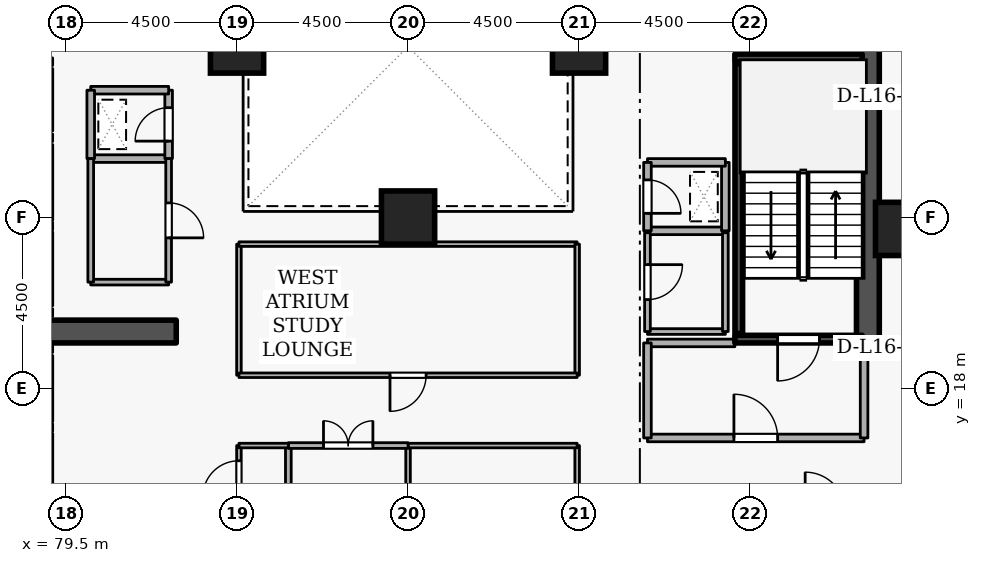
"""IFC4 building model, lengths in metres.
Left out: names, types, materials, properties, quantities, classifications, styles, units other than length and angle.
Written with IfcOpenShell. Run it as: python <this file> out.ifc"""

import sys

from ifc_helpers import new_model, si_unit, direction, frame, frame_2d, origin, origin_2d, place, context, subcontext, project, spatial, rectangle, extrude, element, fill, save


model = new_model("IFC4")
c1 = context("Model", 3, precision=1e-05, world=origin(), true_north=direction((0.0, 1.0)))
c2 = subcontext(c1, "Body", "Model", "MODEL_VIEW")
j1 = project(units=[si_unit("LENGTHUNIT", "METRE"), si_unit("PLANEANGLEUNIT", "RADIAN")], contexts=[c1])
p1 = place(None, origin())
s1 = spatial("IfcSite", under=j1, at=p1, CompositionType="ELEMENT")
p2 = place(p1, origin())
s2 = spatial("IfcBuilding", under=s1, at=p2, CompositionType="ELEMENT")
p3 = place(p2, frame((0.0, 0.0, 64.5)))
s3 = spatial("IfcBuildingStorey", under=s2, at=p3, CompositionType="ELEMENT", Elevation=64.5)
p4 = place(p3, frame((100.6, 19.2, 0.0), z_axis=(0.0, 0.0, 1.0), x_axis=(0.0, 1.0, 0.0)))
e1 = element("IfcWall", 1, at=p4, inside=s3, PredefinedType="SHEAR", context=c2, shape_type="SweptSolid", body=[
    extrude(rectangle(XDim=15.6, YDim=0.6, at=frame_2d((7.8, 0.0))), origin(), (0.0, 0.0, 1.0), 3.6),
])
p5 = place(p3, frame((76.7, 19.5, 0.0), z_axis=(0.0, 0.0, 1.0), x_axis=(1.0, 0.0, 0.0)))
e2 = element("IfcWall", 2, at=p5, inside=s3, PredefinedType="SHEAR", context=c2, shape_type="SweptSolid", body=[
    extrude(rectangle(XDim=5.7, YDim=0.6, at=frame_2d((2.85, 0.0))), origin(), (0.0, 0.0, 1.0), 3.6),
])
for number, where, z_axis, x_axis in (
    (3, (101.5, 22.2, 0.0), (0.0, 0.0, 1.0), (1.0, 0.0, 0.0)),
    (4, (93.0, 27.0, 0.0), (0.0, 0.0, 1.0), (1.0, 0.0, 0.0)),
    (5, (84.0, 27.0, 0.0), (0.0, 0.0, 1.0), (1.0, 0.0, 0.0)),
    (6, (88.5, 22.5, 0.0), (0.0, 0.0, 1.0), (1.0, 0.0, 0.0)),
):
    element("IfcColumn", number, at=place(p3, frame(where, z_axis=z_axis, x_axis=x_axis)), inside=s3, PredefinedType="COLUMN", context=c2, shape_type="SweptSolid", body=[
        extrude(rectangle(XDim=1.4, YDim=1.4, at=origin_2d()), origin(), (0.0, 0.0, 1.0), 3.6),
    ])
p6 = place(p3, frame((79.05, 24.78, 0.0), z_axis=(0.0, 0.0, 1.0), x_axis=(0.0, 1.0, 0.0)))
e7 = element("IfcWall", 7, at=p6, inside=s3, PredefinedType="STANDARD", context=c2, shape_type="SweptSolid", body=[
    extrude(rectangle(XDim=1.64, YDim=0.2, at=frame_2d((0.82, 0.0))), origin(), (0.0, 0.0, 1.0), 3.34),
])
p7 = place(p6, frame((0.31, 0.0, 0.0)))
e8 = element("IfcOpeningElement", 8, at=p7, cuts=e7, PredefinedType="OPENING", context=c2, shape_type="SweptSolid", body=[
    extrude(rectangle(XDim=1.02, YDim=2.06, at=frame_2d((0.51, 1.03))), frame((0.0, 0.11, 0.0), z_axis=(0.0, -1.0, 0.0), x_axis=(1.0, 0.0, 0.0)), (0.0, 0.0, 1.0), 0.22),
])
p8 = place(p3, frame((79.05, 22.43, 0.0), z_axis=(0.0, 0.0, 1.0), x_axis=(0.0, 1.0, 0.0)))
e9 = element("IfcWall", 9, at=p8, inside=s3, PredefinedType="STANDARD", context=c2, shape_type="SweptSolid", body=[
    extrude(rectangle(XDim=1.99, YDim=0.2, at=frame_2d((0.995, 0.0))), origin(), (0.0, 0.0, 1.0), 3.34),
])
p9 = place(p3, frame((79.05, 20.18, 0.0), z_axis=(0.0, 0.0, 1.0), x_axis=(0.0, 1.0, 0.0)))
e10 = element("IfcWall", 10, at=p9, inside=s3, PredefinedType="STANDARD", context=c2, shape_type="SweptSolid", body=[
    extrude(rectangle(XDim=1.94, YDim=0.2, at=frame_2d((0.97, 0.0))), origin(), (0.0, 0.0, 1.0), 3.34),
])
p10 = place(p3, frame((79.05, 17.13, 0.0), z_axis=(0.0, 0.0, 1.0), x_axis=(0.0, 1.0, 0.0)))
e11 = element("IfcWall", 11, at=p10, inside=s3, PredefinedType="STANDARD", context=c2, shape_type="SweptSolid", body=[
    extrude(rectangle(XDim=1.74, YDim=0.2, at=frame_2d((0.87, 0.0))), origin(), (0.0, 0.0, 1.0), 3.34),
])
p11 = place(p3, frame((79.05, 15.03, 0.0), z_axis=(0.0, 0.0, 1.0), x_axis=(0.0, 1.0, 0.0)))
e12 = element("IfcWall", 12, at=p11, inside=s3, PredefinedType="STANDARD", context=c2, shape_type="SweptSolid", body=[
    extrude(rectangle(XDim=1.79, YDim=0.2, at=frame_2d((0.895, 0.0))), origin(), (0.0, 0.0, 1.0), 3.34),
])
p12 = place(p3, frame((100.45, 19.3, 0.0), z_axis=(0.0, 0.0, 1.0), x_axis=(-1.0, 0.0, 0.0)))
e13 = element("IfcWall", 13, at=p12, inside=s3, PredefinedType="SHEAR", context=c2, shape_type="SweptSolid", body=[
    extrude(rectangle(XDim=3.35, YDim=0.2, at=frame_2d((1.675, 0.0))), origin(), (0.0, 0.0, 1.0), 3.6),
])
p13 = place(p12, frame((1.125, 0.0, 0.0)))
e14 = element("IfcOpeningElement", 14, at=p13, cuts=e13, PredefinedType="OPENING", context=c2, shape_type="SweptSolid", body=[
    extrude(rectangle(XDim=1.1, YDim=2.1, at=frame_2d((0.55, 1.05))), frame((0.0, 0.11, 0.0), z_axis=(0.0, -1.0, 0.0), x_axis=(1.0, 0.0, 0.0)), (0.0, 0.0, 1.0), 0.22),
])
p14 = place(p3, frame((97.1, 26.7, 0.0), z_axis=(0.0, 0.0, 1.0), x_axis=(1.0, 0.0, 0.0)))
e15 = element("IfcWall", 15, at=p14, inside=s3, PredefinedType="SHEAR", context=c2, shape_type="SweptSolid", body=[
    extrude(rectangle(XDim=3.35, YDim=0.2, at=frame_2d((1.675, 0.0))), origin(), (0.0, 0.0, 1.0), 3.6),
])
p15 = place(p3, frame((97.203, 26.55, 0.0), z_axis=(0.0, 0.0, 1.0), x_axis=(0.0, -1.0, 0.0)))
e16 = element("IfcWall", 16, at=p15, inside=s3, PredefinedType="SHEAR", context=c2, shape_type="SweptSolid", body=[
    extrude(rectangle(XDim=7.1, YDim=0.2, at=frame_2d((3.55, 0.0))), origin(), (0.0, 0.0, 1.0), 3.6),
])
p16 = place(p3, frame((94.8, 16.7, 0.0), z_axis=(0.0, 0.0, 1.0), x_axis=(1.0, 0.0, 0.0)))
e17 = element("IfcWall", 17, at=p16, inside=s3, PredefinedType="STANDARD", context=c2, shape_type="SweptSolid", body=[
    extrude(rectangle(XDim=5.7, YDim=0.2, at=frame_2d((2.85, 0.0))), origin(), (0.0, 0.0, 1.0), 3.34),
])
p17 = place(p16, frame((2.275, 0.0, 0.0)))
e18 = element("IfcOpeningElement", 18, at=p17, cuts=e17, PredefinedType="OPENING", context=c2, shape_type="SweptSolid", body=[
    extrude(rectangle(XDim=1.15, YDim=2.1, at=frame_2d((0.575, 1.05))), frame((0.0, 0.11, 0.0), z_axis=(0.0, -1.0, 0.0), x_axis=(1.0, 0.0, 0.0)), (0.0, 0.0, 1.0), 0.22),
])
p18 = place(p3, frame((100.5, 16.7, 0.0), z_axis=(0.0, 0.0, 1.0), x_axis=(0.0, 1.0, 0.0)))
e19 = element("IfcWall", 19, at=p18, inside=s3, PredefinedType="STANDARD", context=c2, shape_type="SweptSolid", body=[
    extrude(rectangle(XDim=2.5, YDim=0.2, at=frame_2d((1.25, 0.0))), origin(), (0.0, 0.0, 1.0), 3.34),
])
p19 = place(p3, frame((97.1, 19.2, 0.0), z_axis=(0.0, 0.0, 1.0), x_axis=(-1.0, 0.0, 0.0)))
e20 = element("IfcWall", 20, at=p19, inside=s3, PredefinedType="STANDARD", context=c2, shape_type="SweptSolid", body=[
    extrude(rectangle(XDim=2.3, YDim=0.2, at=frame_2d((1.15, 0.0))), origin(), (0.0, 0.0, 1.0), 2.545),
])
p20 = place(p3, frame((94.8, 19.2, 0.0), z_axis=(0.0, 0.0, 1.0), x_axis=(0.0, -1.0, 0.0)))
e21 = element("IfcWall", 21, at=p20, inside=s3, PredefinedType="STANDARD", context=c2, shape_type="SweptSolid", body=[
    extrude(rectangle(XDim=2.5, YDim=0.2, at=frame_2d((1.25, 0.0))), origin(), (0.0, 0.0, 1.0), 3.34),
])
p21 = place(p3, frame((94.8, 22.15, 0.0), z_axis=(0.0, 0.0, 1.0), x_axis=(1.0, 0.0, 0.0)))
e22 = element("IfcWall", 22, at=p21, inside=s3, PredefinedType="STANDARD", context=c2, shape_type="SweptSolid", body=[
    extrude(rectangle(XDim=2.05, YDim=0.2, at=frame_2d((1.025, 0.0))), origin(), (0.0, 0.0, 1.0), 3.34),
])
p22 = place(p3, frame((96.85, 22.15, 0.0), z_axis=(0.0, 0.0, 1.0), x_axis=(0.0, 1.0, 0.0)))
e23 = element("IfcWall", 23, at=p22, inside=s3, PredefinedType="STANDARD", context=c2, shape_type="SweptSolid", body=[
    extrude(rectangle(XDim=1.8, YDim=0.2, at=frame_2d((0.9, 0.0))), origin(), (0.0, 0.0, 1.0), 3.34),
])
p23 = place(p3, frame((96.85, 23.95, 0.0), z_axis=(0.0, 0.0, 1.0), x_axis=(-1.0, 0.0, 0.0)))
e24 = element("IfcWall", 24, at=p23, inside=s3, PredefinedType="STANDARD", context=c2, shape_type="SweptSolid", body=[
    extrude(rectangle(XDim=2.05, YDim=0.2, at=frame_2d((1.025, 0.0))), origin(), (0.0, 0.0, 1.0), 3.34),
])
p24 = place(p3, frame((94.8, 23.95, 0.0), z_axis=(0.0, 0.0, 1.0), x_axis=(0.0, -1.0, 0.0)))
e25 = element("IfcWall", 25, at=p24, inside=s3, PredefinedType="STANDARD", context=c2, shape_type="SweptSolid", body=[
    extrude(rectangle(XDim=1.8, YDim=0.2, at=frame_2d((0.9, 0.0))), origin(), (0.0, 0.0, 1.0), 3.34),
])
p25 = place(p24, frame((0.46, 0.0, 0.0)))
e26 = element("IfcOpeningElement", 26, at=p25, cuts=e25, PredefinedType="OPENING", context=c2, shape_type="SweptSolid", body=[
    extrude(rectangle(XDim=0.88, YDim=2.04, at=frame_2d((0.44, 1.02))), frame((0.0, 0.11, 0.0), z_axis=(0.0, -1.0, 0.0), x_axis=(1.0, 0.0, 0.0)), (0.0, 0.0, 1.0), 0.22),
])
p26 = place(p3, frame((80.15, 24.05, 0.0), z_axis=(0.0, 0.0, 1.0), x_axis=(1.0, 0.0, 0.0)))
e27 = element("IfcWall", 27, at=p26, inside=s3, PredefinedType="STANDARD", context=c2, shape_type="SweptSolid", body=[
    extrude(rectangle(XDim=2.05, YDim=0.2, at=frame_2d((1.025, 0.0))), origin(), (0.0, 0.0, 1.0), 3.34),
])
p27 = place(p3, frame((82.2, 24.05, 0.0), z_axis=(0.0, 0.0, 1.0), x_axis=(0.0, 1.0, 0.0)))
e28 = element("IfcWall", 28, at=p27, inside=s3, PredefinedType="STANDARD", context=c2, shape_type="SweptSolid", body=[
    extrude(rectangle(XDim=1.8, YDim=0.2, at=frame_2d((0.9, 0.0))), origin(), (0.0, 0.0, 1.0), 3.34),
])
p28 = place(p27, frame((0.46, 0.0, 0.0)))
e29 = element("IfcOpeningElement", 29, at=p28, cuts=e28, PredefinedType="OPENING", context=c2, shape_type="SweptSolid", body=[
    extrude(rectangle(XDim=0.88, YDim=2.04, at=frame_2d((0.44, 1.02))), frame((0.0, 0.11, 0.0), z_axis=(0.0, -1.0, 0.0), x_axis=(1.0, 0.0, 0.0)), (0.0, 0.0, 1.0), 0.22),
])
p29 = place(p3, frame((82.2, 25.85, 0.0), z_axis=(0.0, 0.0, 1.0), x_axis=(-1.0, 0.0, 0.0)))
e30 = element("IfcWall", 30, at=p29, inside=s3, PredefinedType="STANDARD", context=c2, shape_type="SweptSolid", body=[
    extrude(rectangle(XDim=2.05, YDim=0.2, at=frame_2d((1.025, 0.0))), origin(), (0.0, 0.0, 1.0), 3.34),
])
p30 = place(p3, frame((80.15, 25.85, 0.0), z_axis=(0.0, 0.0, 1.0), x_axis=(0.0, -1.0, 0.0)))
e31 = element("IfcWall", 31, at=p30, inside=s3, PredefinedType="STANDARD", context=c2, shape_type="SweptSolid", body=[
    extrude(rectangle(XDim=1.8, YDim=0.2, at=frame_2d((0.9, 0.0))), origin(), (0.0, 0.0, 1.0), 3.34),
])
p31 = place(p3, frame((94.8, 19.5, 0.0), z_axis=(0.0, 0.0, 1.0), x_axis=(1.0, 0.0, 0.0)))
e32 = element("IfcWall", 32, at=p31, inside=s3, PredefinedType="PARTITIONING", context=c2, shape_type="SweptSolid", body=[
    extrude(rectangle(XDim=2.05, YDim=0.15, at=frame_2d((1.025, 0.0))), origin(), (0.0, 0.0, 1.0), 2.545),
])
p32 = place(p3, frame((96.85, 19.5, 0.0), z_axis=(0.0, 0.0, 1.0), x_axis=(0.0, 1.0, 0.0)))
e33 = element("IfcWall", 33, at=p32, inside=s3, PredefinedType="PARTITIONING", context=c2, shape_type="SweptSolid", body=[
    extrude(rectangle(XDim=2.6, YDim=0.15, at=frame_2d((1.3, 0.0))), origin(), (0.0, 0.0, 1.0), 3.34),
])
p33 = place(p3, frame((94.8, 22.1, 0.0), z_axis=(0.0, 0.0, 1.0), x_axis=(0.0, -1.0, 0.0)))
e34 = element("IfcWall", 34, at=p33, inside=s3, PredefinedType="PARTITIONING", context=c2, shape_type="SweptSolid", body=[
    extrude(rectangle(XDim=2.6, YDim=0.15, at=frame_2d((1.3, 0.0))), origin(), (0.0, 0.0, 1.0), 3.34),
])
p34 = place(p33, frame((0.84, 0.0, 0.0)))
e35 = element("IfcOpeningElement", 35, at=p34, cuts=e34, PredefinedType="OPENING", context=c2, shape_type="SweptSolid", body=[
    extrude(rectangle(XDim=0.92, YDim=2.08, at=frame_2d((0.46, 1.04))), frame((0.0, 0.085, 0.0), z_axis=(0.0, -1.0, 0.0), x_axis=(1.0, 0.0, 0.0)), (0.0, 0.0, 1.0), 0.17),
])
p35 = place(p3, frame((82.2, 20.8, 0.0), z_axis=(0.0, 0.0, 1.0), x_axis=(-1.0, 0.0, 0.0)))
e36 = element("IfcWall", 36, at=p35, inside=s3, PredefinedType="PARTITIONING", context=c2, shape_type="SweptSolid", body=[
    extrude(rectangle(XDim=2.05, YDim=0.15, at=frame_2d((1.025, 0.0))), origin(), (0.0, 0.0, 1.0), 3.34),
])
p36 = place(p3, frame((80.15, 20.8, 0.0), z_axis=(0.0, 0.0, 1.0), x_axis=(0.0, 1.0, 0.0)))
e37 = element("IfcWall", 37, at=p36, inside=s3, PredefinedType="PARTITIONING", context=c2, shape_type="SweptSolid", body=[
    extrude(rectangle(XDim=3.25, YDim=0.15, at=frame_2d((1.625, 0.0))), origin(), (0.0, 0.0, 1.0), 3.34),
])
p37 = place(p3, frame((82.2, 24.05, 0.0), z_axis=(0.0, 0.0, 1.0), x_axis=(0.0, -1.0, 0.0)))
e38 = element("IfcWall", 38, at=p37, inside=s3, PredefinedType="PARTITIONING", context=c2, shape_type="SweptSolid", body=[
    extrude(rectangle(XDim=3.25, YDim=0.15, at=frame_2d((1.625, 0.0))), origin(), (0.0, 0.0, 1.0), 3.34),
])
p38 = place(p37, frame((1.165, 0.0, 0.0)))
e39 = element("IfcOpeningElement", 39, at=p38, cuts=e38, PredefinedType="OPENING", context=c2, shape_type="SweptSolid", body=[
    extrude(rectangle(XDim=0.92, YDim=2.08, at=frame_2d((0.46, 1.04))), frame((0.0, 0.085, 0.0), z_axis=(0.0, -1.0, 0.0), x_axis=(1.0, 0.0, 0.0)), (0.0, 0.0, 1.0), 0.17),
])
p39 = place(p3, frame((92.95, 16.5, 0.0), z_axis=(0.0, 0.0, 1.0), x_axis=(0.0, -1.0, 0.0)))
e40 = element("IfcWall", 40, at=p39, inside=s3, PredefinedType="PARTITIONING", context=c2, shape_type="SweptSolid", body=[
    extrude(rectangle(XDim=1.75, YDim=0.12, at=frame_2d((0.875, 0.0))), origin(), (0.0, 0.0, 1.0), 3.34),
])
p40 = place(p3, frame((88.5, 8.78, 0.0), z_axis=(0.0, 0.0, 1.0), x_axis=(0.0, 1.0, 0.0)))
e41 = element("IfcWall", 41, at=p40, inside=s3, PredefinedType="PARTITIONING", context=c2, shape_type="SweptSolid", body=[
    extrude(rectangle(XDim=7.72, YDim=0.12, at=frame_2d((3.86, 0.0))), origin(), (0.0, 0.0, 1.0), 2.878),
])
p41 = place(p3, frame((88.5, 16.5, 0.0), z_axis=(0.0, 0.0, 1.0), x_axis=(1.0, 0.0, 0.0)))
e42 = element("IfcWall", 42, at=p41, inside=s3, PredefinedType="PARTITIONING", context=c2, shape_type="SweptSolid", body=[
    extrude(rectangle(XDim=4.45, YDim=0.12, at=frame_2d((2.225, 0.0))), origin(), (0.0, 0.0, 1.0), 3.34),
])
p42 = place(p3, frame((85.35, 8.78, 0.0), z_axis=(0.0, 0.0, 1.0), x_axis=(0.0, 1.0, 0.0)))
e43 = element("IfcWall", 43, at=p42, inside=s3, PredefinedType="PARTITIONING", context=c2, shape_type="SweptSolid", body=[
    extrude(rectangle(XDim=7.72, YDim=0.15, at=frame_2d((3.86, 0.0))), origin(), (0.0, 0.0, 1.0), 3.34),
])
p43 = place(p3, frame((85.35, 16.5, 0.0), z_axis=(0.0, 0.0, 1.0), x_axis=(1.0, 0.0, 0.0)))
e44 = element("IfcWall", 44, at=p43, inside=s3, PredefinedType="PARTITIONING", context=c2, shape_type="SweptSolid", body=[
    extrude(rectangle(XDim=3.15, YDim=0.15, at=frame_2d((1.575, 0.0))), origin(), (0.0, 0.0, 1.0), 3.34),
])
p44 = place(p43, frame((0.925, 0.0, 0.0)))
e45 = element("IfcOpeningElement", 45, at=p44, cuts=e44, PredefinedType="OPENING", context=c2, shape_type="SweptSolid", body=[
    extrude(rectangle(XDim=1.3, YDim=2.12, at=frame_2d((0.65, 1.06))), frame((0.0, 0.085, 0.0), z_axis=(0.0, -1.0, 0.0), x_axis=(1.0, 0.0, 0.0)), (0.0, 0.0, 1.0), 0.17),
])
p45 = place(p3, frame((84.05, 14.75, 0.0), z_axis=(0.0, 0.0, 1.0), x_axis=(0.0, 1.0, 0.0)))
e46 = element("IfcWall", 46, at=p45, inside=s3, PredefinedType="PARTITIONING", context=c2, shape_type="SweptSolid", body=[
    extrude(rectangle(XDim=1.75, YDim=0.12, at=frame_2d((0.875, 0.0))), origin(), (0.0, 0.0, 1.0), 3.34),
])
p46 = place(p45, frame((0.4, 0.0, 0.0)))
e47 = element("IfcOpeningElement", 47, at=p46, cuts=e46, PredefinedType="OPENING", context=c2, shape_type="SweptSolid", body=[
    extrude(rectangle(XDim=0.95, YDim=2.1, at=frame_2d((0.475, 1.05))), frame((0.0, 0.07, 0.0), z_axis=(0.0, -1.0, 0.0), x_axis=(1.0, 0.0, 0.0)), (0.0, 0.0, 1.0), 0.14),
])
p47 = place(p3, frame((84.05, 16.5, 0.0), z_axis=(0.0, 0.0, 1.0), x_axis=(1.0, 0.0, 0.0)))
e48 = element("IfcWall", 48, at=p47, inside=s3, PredefinedType="PARTITIONING", context=c2, shape_type="SweptSolid", body=[
    extrude(rectangle(XDim=1.3, YDim=0.12, at=frame_2d((0.65, 0.0))), origin(), (0.0, 0.0, 1.0), 3.34),
])
p48 = place(p3, frame((84.05, 18.35, 0.0), z_axis=(0.0, 0.0, 1.0), x_axis=(0.0, 1.0, 0.0)))
e49 = element("IfcWall", 49, at=p48, inside=s3, PredefinedType="PARTITIONING", context=c2, shape_type="SweptSolid", body=[
    extrude(rectangle(XDim=3.45, YDim=0.12, at=frame_2d((1.725, 0.0))), origin(), (0.0, 0.0, 1.0), 3.34),
])
p49 = place(p3, frame((84.05, 21.8, 0.0), z_axis=(0.0, 0.0, 1.0), x_axis=(1.0, 0.0, 0.0)))
e50 = element("IfcWall", 50, at=p49, inside=s3, PredefinedType="PARTITIONING", context=c2, shape_type="SweptSolid", body=[
    extrude(rectangle(XDim=8.9, YDim=0.12, at=frame_2d((4.45, 0.0))), origin(), (0.0, 0.0, 1.0), 3.34),
])
p50 = place(p3, frame((92.95, 21.8, 0.0), z_axis=(0.0, 0.0, 1.0), x_axis=(0.0, -1.0, 0.0)))
e51 = element("IfcWall", 51, at=p50, inside=s3, PredefinedType="PARTITIONING", context=c2, shape_type="SweptSolid", body=[
    extrude(rectangle(XDim=3.45, YDim=0.12, at=frame_2d((1.725, 0.0))), origin(), (0.0, 0.0, 1.0), 3.34),
])
p51 = place(p3, frame((92.95, 18.35, 0.0), z_axis=(0.0, 0.0, 1.0), x_axis=(-1.0, 0.0, 0.0)))
e52 = element("IfcWall", 52, at=p51, inside=s3, PredefinedType="PARTITIONING", context=c2, shape_type="SweptSolid", body=[
    extrude(rectangle(XDim=8.9, YDim=0.12, at=frame_2d((4.45, 0.0))), origin(), (0.0, 0.0, 1.0), 3.34),
])
p52 = place(p51, frame((3.975, 0.0, 0.0)))
e53 = element("IfcOpeningElement", 53, at=p52, cuts=e52, PredefinedType="OPENING", context=c2, shape_type="SweptSolid", body=[
    extrude(rectangle(XDim=0.95, YDim=2.1, at=frame_2d((0.475, 1.05))), frame((0.0, 0.07, 0.0), z_axis=(0.0, -1.0, 0.0), x_axis=(1.0, 0.0, 0.0)), (0.0, 0.0, 1.0), 0.14),
])
p53 = place(p13, origin())
e54 = element("IfcDoor", 54, at=p53, inside=s3, OperationType="SINGLE_SWING_RIGHT", PredefinedType="DOOR", context=c2, shape_type="SweptSolid", body=[
    extrude(rectangle(XDim=1.1, YDim=2.1, at=frame_2d((0.55, 1.05))), frame((0.0, 0.025, 0.0), z_axis=(0.0, -1.0, 0.0), x_axis=(1.0, 0.0, 0.0)), (0.0, 0.0, 1.0), 0.05),
])
fill(e14, e54)
p54 = place(p17, origin())
e55 = element("IfcDoor", 55, at=p54, inside=s3, OperationType="SINGLE_SWING_LEFT", PredefinedType="DOOR", context=c2, shape_type="SweptSolid", body=[
    extrude(rectangle(XDim=1.15, YDim=2.1, at=frame_2d((0.575, 1.05))), frame((0.0, 0.025, 0.0), z_axis=(0.0, -1.0, 0.0), x_axis=(1.0, 0.0, 0.0)), (0.0, 0.0, 1.0), 0.05),
])
fill(e18, e55)
p55 = place(p25, origin())
e56 = element("IfcDoor", 56, at=p55, inside=s3, OperationType="SINGLE_SWING_RIGHT", PredefinedType="DOOR", context=c2, shape_type="SweptSolid", body=[
    extrude(rectangle(XDim=0.88, YDim=2.04, at=frame_2d((0.44, 1.02))), frame((0.0, 0.025, 0.0), z_axis=(0.0, -1.0, 0.0), x_axis=(1.0, 0.0, 0.0)), (0.0, 0.0, 1.0), 0.05),
])
fill(e26, e56)
p56 = place(p28, origin())
e57 = element("IfcDoor", 57, at=p56, inside=s3, OperationType="SINGLE_SWING_LEFT", PredefinedType="DOOR", context=c2, shape_type="SweptSolid", body=[
    extrude(rectangle(XDim=0.88, YDim=2.04, at=frame_2d((0.44, 1.02))), frame((0.0, 0.025, 0.0), z_axis=(0.0, -1.0, 0.0), x_axis=(1.0, 0.0, 0.0)), (0.0, 0.0, 1.0), 0.05),
])
fill(e29, e57)
p57 = place(p34, origin())
e58 = element("IfcDoor", 58, at=p57, inside=s3, OperationType="SINGLE_SWING_LEFT", PredefinedType="DOOR", context=c2, shape_type="SweptSolid", body=[
    extrude(rectangle(XDim=0.92, YDim=2.08, at=frame_2d((0.46, 1.04))), frame((0.0, 0.025, 0.0), z_axis=(0.0, -1.0, 0.0), x_axis=(1.0, 0.0, 0.0)), (0.0, 0.0, 1.0), 0.05),
])
fill(e35, e58)
p58 = place(p38, origin())
e59 = element("IfcDoor", 59, at=p58, inside=s3, OperationType="SINGLE_SWING_RIGHT", PredefinedType="DOOR", context=c2, shape_type="SweptSolid", body=[
    extrude(rectangle(XDim=0.92, YDim=2.08, at=frame_2d((0.46, 1.04))), frame((0.0, 0.025, 0.0), z_axis=(0.0, -1.0, 0.0), x_axis=(1.0, 0.0, 0.0)), (0.0, 0.0, 1.0), 0.05),
])
fill(e39, e59)
p59 = place(p44, origin())
e60 = element("IfcDoor", 60, at=p59, inside=s3, OperationType="DOUBLE_DOOR_SINGLE_SWING", PredefinedType="DOOR", context=c2, shape_type="SweptSolid", body=[
    extrude(rectangle(XDim=1.3, YDim=2.12, at=frame_2d((0.65, 1.06))), frame((0.0, 0.025, 0.0), z_axis=(0.0, -1.0, 0.0), x_axis=(1.0, 0.0, 0.0)), (0.0, 0.0, 1.0), 0.05),
])
fill(e45, e60)
p60 = place(p46, origin())
e61 = element("IfcDoor", 61, at=p60, inside=s3, OperationType="SINGLE_SWING_LEFT", PredefinedType="DOOR", context=c2, shape_type="SweptSolid", body=[
    extrude(rectangle(XDim=0.95, YDim=2.1, at=frame_2d((0.475, 1.05))), frame((0.0, 0.025, 0.0), z_axis=(0.0, -1.0, 0.0), x_axis=(1.0, 0.0, 0.0)), (0.0, 0.0, 1.0), 0.05),
])
fill(e47, e61)
p61 = place(p52, origin())
e62 = element("IfcDoor", 62, at=p61, inside=s3, OperationType="SINGLE_SWING_RIGHT", PredefinedType="DOOR", context=c2, shape_type="SweptSolid", body=[
    extrude(rectangle(XDim=0.95, YDim=2.1, at=frame_2d((0.475, 1.05))), frame((0.0, 0.025, 0.0), z_axis=(0.0, -1.0, 0.0), x_axis=(1.0, 0.0, 0.0)), (0.0, 0.0, 1.0), 0.05),
])
fill(e53, e62)
save(model, sys.argv[1])
